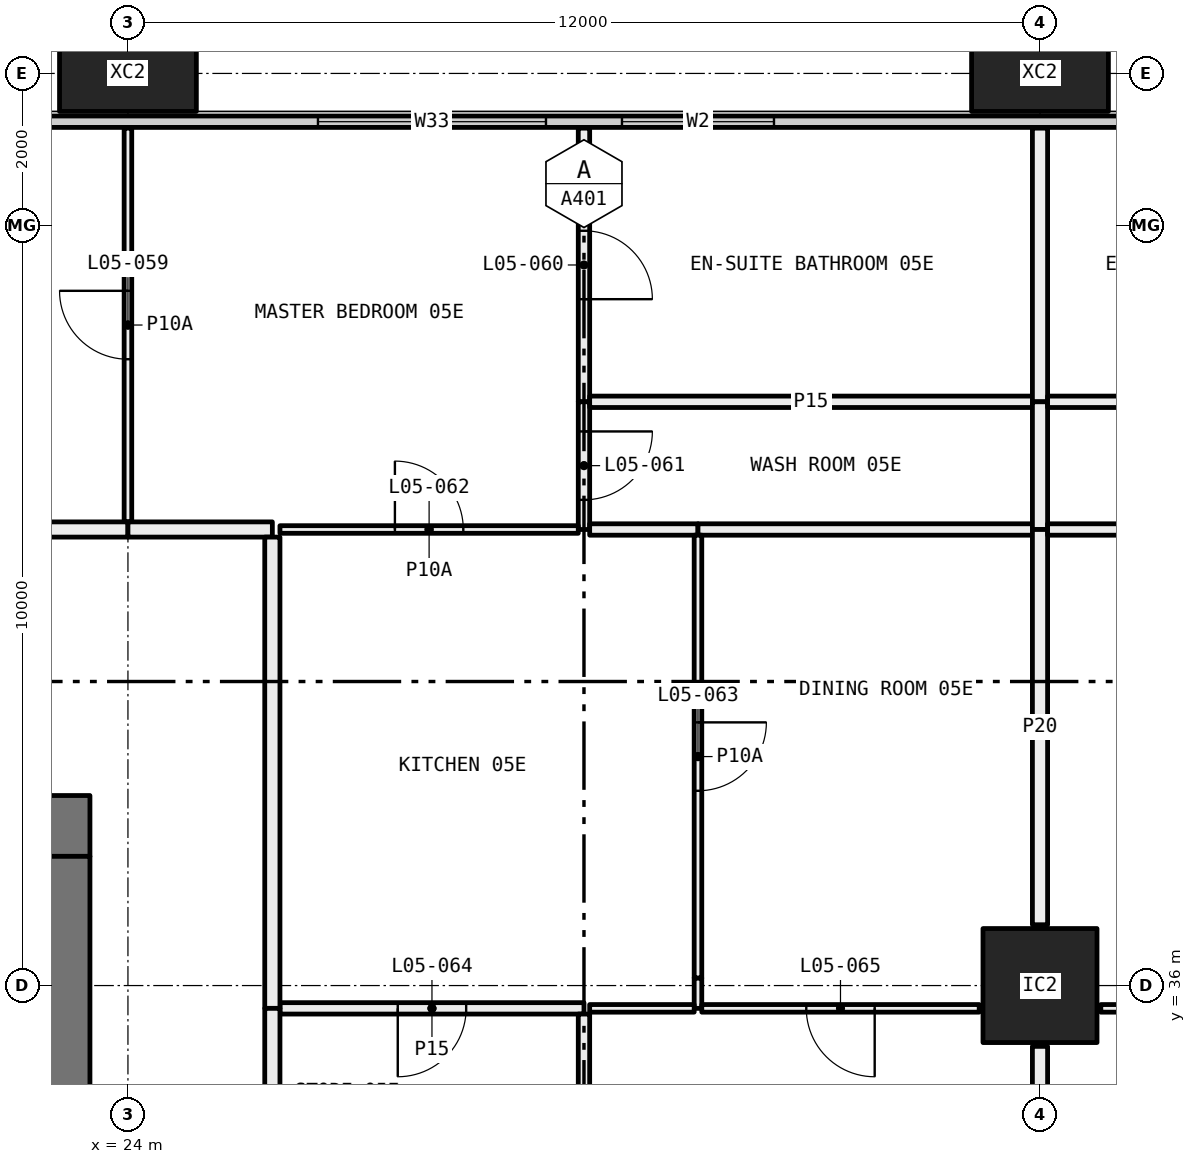
"""IFC4 building model, lengths in metres.
Left out: names, types, materials, properties, quantities, classifications, styles, units other than length and angle.
Written with IfcOpenShell. Run it as: python <this file> out.ifc"""

import sys

from ifc_helpers import new_model, si_unit, direction, frame, frame_2d, origin, origin_2d, place, context, subcontext, project, spatial, rectangle, hollow_rectangle, extrude, element, fill, save


model = new_model("IFC4")
c1 = context("Model", 3, precision=1e-05, world=origin(), true_north=direction((0.0, 1.0)))
c2 = subcontext(c1, "Body", "Model", "MODEL_VIEW")
j1 = project(units=[si_unit("LENGTHUNIT", "METRE"), si_unit("PLANEANGLEUNIT", "RADIAN")], contexts=[c1])
p1 = place(None, origin())
s1 = spatial("IfcSite", under=j1, at=p1, CompositionType="ELEMENT")
p2 = place(p1, origin())
s2 = spatial("IfcBuilding", under=s1, at=p2, CompositionType="ELEMENT")
p3 = place(p2, frame((0.0, 0.0, 30.0)))
s3 = spatial("IfcBuildingStorey", under=s2, at=p3, CompositionType="ELEMENT", Elevation=30.0)
p4 = place(p3, frame((24.0, 48.0, -0.4), z_axis=(0.0, 0.0, 1.0), x_axis=(1.0, 0.0, 0.0)))
e1 = element("IfcColumn", 1, at=p4, inside=s3, PredefinedType="COLUMN", context=c2, shape_type="SweptSolid", body=[
    extrude(hollow_rectangle(XDim=1.8, YDim=1.0, WallThickness=0.07, at=origin_2d()), origin(), (0.0, 0.0, 1.0), 3.45),
])
p5 = place(p3, frame((36.0, 36.0, 0.0), z_axis=(0.0, 0.0, 1.0), x_axis=(1.0, 0.0, 0.0)))
e2 = element("IfcColumn", 2, at=p5, inside=s3, PredefinedType="COLUMN", context=c2, shape_type="SweptSolid", body=[
    extrude(hollow_rectangle(XDim=1.5, YDim=1.5, WallThickness=0.065, at=origin_2d()), origin(), (0.0, 0.0, 1.0), 3.05),
])
p6 = place(p3, frame((36.0, 48.0, -0.4), z_axis=(0.0, 0.0, 1.0), x_axis=(1.0, 0.0, 0.0)))
e3 = element("IfcColumn", 3, at=p6, inside=s3, PredefinedType="COLUMN", context=c2, shape_type="SweptSolid", body=[
    extrude(hollow_rectangle(XDim=1.8, YDim=1.0, WallThickness=0.07, at=origin_2d()), origin(), (0.0, 0.0, 1.0), 3.45),
])
p7 = place(p3, frame((6.56, 47.365, 0.0), z_axis=(0.0, 0.0, 1.0), x_axis=(1.0, 0.0, 0.0)))
e4 = element("IfcWall", 4, at=p7, inside=s3, PredefinedType="ELEMENTEDWALL", context=c2, shape_type="SweptSolid", body=[
    extrude(rectangle(XDim=58.88, YDim=0.15, at=frame_2d((29.44, 0.0))), origin(), (0.0, 0.0, 1.0), 3.05),
])
p8 = place(p7, frame((0.44, 0.0, 0.45)))
e5 = element("IfcOpeningElement", 5, at=p8, cuts=e4, PredefinedType="OPENING", context=c2, shape_type="SweptSolid", body=[
    extrude(rectangle(XDim=4.5, YDim=2.55, at=frame_2d((2.25, 1.275))), frame((0.0, 0.085, 0.0), z_axis=(0.0, -1.0, 0.0), x_axis=(1.0, 0.0, 0.0)), (0.0, 0.0, 1.0), 0.17),
])
p9 = place(p7, frame((7.94, 0.0, 0.45)))
e6 = element("IfcOpeningElement", 6, at=p9, cuts=e4, PredefinedType="OPENING", context=c2, shape_type="SweptSolid", body=[
    extrude(rectangle(XDim=3.0, YDim=2.55, at=frame_2d((1.5, 1.275))), frame((0.0, 0.085, 0.0), z_axis=(0.0, -1.0, 0.0), x_axis=(1.0, 0.0, 0.0)), (0.0, 0.0, 1.0), 0.17),
])
p10 = place(p7, frame((11.94, 0.0, 0.45)))
e7 = element("IfcOpeningElement", 7, at=p10, cuts=e4, PredefinedType="OPENING", context=c2, shape_type="SweptSolid", body=[
    extrude(rectangle(XDim=3.0, YDim=2.55, at=frame_2d((1.5, 1.275))), frame((0.0, 0.085, 0.0), z_axis=(0.0, -1.0, 0.0), x_axis=(1.0, 0.0, 0.0)), (0.0, 0.0, 1.0), 0.17),
])
p11 = place(p7, frame((19.94, 0.0, 0.45)))
e8 = element("IfcOpeningElement", 8, at=p11, cuts=e4, PredefinedType="OPENING", context=c2, shape_type="SweptSolid", body=[
    extrude(rectangle(XDim=3.0, YDim=2.55, at=frame_2d((1.5, 1.275))), frame((0.0, 0.085, 0.0), z_axis=(0.0, -1.0, 0.0), x_axis=(1.0, 0.0, 0.0)), (0.0, 0.0, 1.0), 0.17),
])
p12 = place(p7, frame((23.94, 0.0, 0.45)))
e9 = element("IfcOpeningElement", 9, at=p12, cuts=e4, PredefinedType="OPENING", context=c2, shape_type="SweptSolid", body=[
    extrude(rectangle(XDim=2.0, YDim=2.55, at=frame_2d((1.0, 1.275))), frame((0.0, 0.085, 0.0), z_axis=(0.0, -1.0, 0.0), x_axis=(1.0, 0.0, 0.0)), (0.0, 0.0, 1.0), 0.17),
])
p13 = place(p7, frame((31.94, 0.0, 0.45)))
e10 = element("IfcOpeningElement", 10, at=p13, cuts=e4, PredefinedType="OPENING", context=c2, shape_type="SweptSolid", body=[
    extrude(rectangle(XDim=3.0, YDim=2.55, at=frame_2d((1.5, 1.275))), frame((0.0, 0.085, 0.0), z_axis=(0.0, -1.0, 0.0), x_axis=(1.0, 0.0, 0.0)), (0.0, 0.0, 1.0), 0.17),
])
p14 = place(p7, frame((35.94, 0.0, 0.45)))
e11 = element("IfcOpeningElement", 11, at=p14, cuts=e4, PredefinedType="OPENING", context=c2, shape_type="SweptSolid", body=[
    extrude(rectangle(XDim=3.0, YDim=2.55, at=frame_2d((1.5, 1.275))), frame((0.0, 0.085, 0.0), z_axis=(0.0, -1.0, 0.0), x_axis=(1.0, 0.0, 0.0)), (0.0, 0.0, 1.0), 0.17),
])
p15 = place(p7, frame((43.94, 0.0, 0.45)))
e12 = element("IfcOpeningElement", 12, at=p15, cuts=e4, PredefinedType="OPENING", context=c2, shape_type="SweptSolid", body=[
    extrude(rectangle(XDim=3.0, YDim=2.55, at=frame_2d((1.5, 1.275))), frame((0.0, 0.085, 0.0), z_axis=(0.0, -1.0, 0.0), x_axis=(1.0, 0.0, 0.0)), (0.0, 0.0, 1.0), 0.17),
])
p16 = place(p7, frame((47.94, 0.0, 0.45)))
e13 = element("IfcOpeningElement", 13, at=p16, cuts=e4, PredefinedType="OPENING", context=c2, shape_type="SweptSolid", body=[
    extrude(rectangle(XDim=2.0, YDim=2.55, at=frame_2d((1.0, 1.275))), frame((0.0, 0.085, 0.0), z_axis=(0.0, -1.0, 0.0), x_axis=(1.0, 0.0, 0.0)), (0.0, 0.0, 1.0), 0.17),
])
p17 = place(p7, frame((53.94, 0.0, 0.45)))
e14 = element("IfcOpeningElement", 14, at=p17, cuts=e4, PredefinedType="OPENING", context=c2, shape_type="SweptSolid", body=[
    extrude(rectangle(XDim=4.5, YDim=2.55, at=frame_2d((2.25, 1.275))), frame((0.0, 0.085, 0.0), z_axis=(0.0, -1.0, 0.0), x_axis=(1.0, 0.0, 0.0)), (0.0, 0.0, 1.0), 0.17),
])
p18 = place(p3, frame((24.0, 42.1, 0.0), z_axis=(0.0, 0.0, 1.0), x_axis=(0.0, 1.0, 0.0)))
e15 = element("IfcWall", 15, at=p18, inside=s3, PredefinedType="PARTITIONING", context=c2, shape_type="SweptSolid", body=[
    extrude(rectangle(XDim=5.18, YDim=0.1, at=frame_2d((2.59, 0.0))), origin(), (0.0, 0.0, 1.0), 3.05),
])
p19 = place(p18, frame((2.14, 0.0, 0.0)))
e16 = element("IfcOpeningElement", 16, at=p19, cuts=e15, PredefinedType="OPENING", context=c2, shape_type="SweptSolid", body=[
    extrude(rectangle(XDim=0.9, YDim=2.1, at=frame_2d((0.45, 1.05))), frame((0.0, 0.06, 0.0), z_axis=(0.0, -1.0, 0.0), x_axis=(1.0, 0.0, 0.0)), (0.0, 0.0, 1.0), 0.12),
])
p20 = place(p3, frame((18.0, 42.0, 0.0), z_axis=(0.0, 0.0, 1.0), x_axis=(1.0, 0.0, 0.0)))
e17 = element("IfcWall", 17, at=p20, inside=s3, PredefinedType="PARTITIONING", context=c2, shape_type="SweptSolid", body=[
    extrude(rectangle(XDim=6.0, YDim=0.2, at=frame_2d((3.0, 0.0))), origin(), (0.0, 0.0, 1.0), 3.05),
])
p21 = place(p3, frame((30.0, 43.68, 0.0), z_axis=(0.0, 0.0, 1.0), x_axis=(0.0, 1.0, 0.0)))
e18 = element("IfcWall", 18, at=p21, inside=s3, PredefinedType="PARTITIONING", context=c2, shape_type="SweptSolid", body=[
    extrude(rectangle(XDim=3.6, YDim=0.15, at=frame_2d((1.8, 0.0))), origin(), (0.0, 0.0, 1.0), 3.05),
])
p22 = place(p21, frame((1.35, 0.0, 0.0)))
e19 = element("IfcOpeningElement", 19, at=p22, cuts=e18, PredefinedType="OPENING", context=c2, shape_type="SweptSolid", body=[
    extrude(rectangle(XDim=0.9, YDim=2.1, at=frame_2d((0.45, 1.05))), frame((0.0, 0.085, 0.0), z_axis=(0.0, -1.0, 0.0), x_axis=(1.0, 0.0, 0.0)), (0.0, 0.0, 1.0), 0.17),
])
p23 = place(p3, frame((30.0, 42.0, 0.0), z_axis=(0.0, 0.0, 1.0), x_axis=(0.0, 1.0, 0.0)))
e20 = element("IfcWall", 20, at=p23, inside=s3, PredefinedType="PARTITIONING", context=c2, shape_type="SweptSolid", body=[
    extrude(rectangle(XDim=1.68, YDim=0.15, at=frame_2d((0.84, 0.0))), origin(), (0.0, 0.0, 1.0), 3.05),
])
p24 = place(p23, frame((0.39, 0.0, 0.0)))
e21 = element("IfcOpeningElement", 21, at=p24, cuts=e20, PredefinedType="OPENING", context=c2, shape_type="SweptSolid", body=[
    extrude(rectangle(XDim=0.9, YDim=2.1, at=frame_2d((0.45, 1.05))), frame((0.0, 0.085, 0.0), z_axis=(0.0, -1.0, 0.0), x_axis=(1.0, 0.0, 0.0)), (0.0, 0.0, 1.0), 0.17),
])
p25 = place(p3, frame((26.0, 42.0, 0.0), z_axis=(0.0, 0.0, 1.0), x_axis=(1.0, 0.0, 0.0)))
e22 = element("IfcWall", 22, at=p25, inside=s3, PredefinedType="PARTITIONING", context=c2, shape_type="SweptSolid", body=[
    extrude(rectangle(XDim=3.925, YDim=0.1, at=frame_2d((1.962, 0.0))), origin(), (0.0, 0.0, 1.0), 3.05),
])
p26 = place(p25, frame((1.512, 0.0, 0.0)))
e23 = element("IfcOpeningElement", 23, at=p26, cuts=e22, PredefinedType="OPENING", context=c2, shape_type="SweptSolid", body=[
    extrude(rectangle(XDim=0.9, YDim=2.1, at=frame_2d((0.45, 1.05))), frame((0.0, 0.06, 0.0), z_axis=(0.0, -1.0, 0.0), x_axis=(1.0, 0.0, 0.0)), (0.0, 0.0, 1.0), 0.12),
])
p27 = place(p3, frame((24.0, 42.0, 0.0), z_axis=(0.0, 0.0, 1.0), x_axis=(1.0, 0.0, 0.0)))
e24 = element("IfcWall", 24, at=p27, inside=s3, PredefinedType="PARTITIONING", context=c2, shape_type="SweptSolid", body=[
    extrude(rectangle(XDim=1.9, YDim=0.2, at=frame_2d((0.95, 0.0))), origin(), (0.0, 0.0, 1.0), 3.05),
])
p28 = place(p3, frame((30.075, 43.68, 0.0), z_axis=(0.0, 0.0, 1.0), x_axis=(1.0, 0.0, 0.0)))
e25 = element("IfcWall", 25, at=p28, inside=s3, PredefinedType="PARTITIONING", context=c2, shape_type="SweptSolid", body=[
    extrude(rectangle(XDim=5.825, YDim=0.15, at=frame_2d((2.913, 0.0))), origin(), (0.0, 0.0, 1.0), 3.05),
])
p29 = place(p3, frame((36.0, 43.68, 0.0), z_axis=(0.0, 0.0, 1.0), x_axis=(0.0, 1.0, 0.0)))
e26 = element("IfcWall", 26, at=p29, inside=s3, PredefinedType="PARTITIONING", context=c2, shape_type="SweptSolid", body=[
    extrude(rectangle(XDim=3.6, YDim=0.2, at=frame_2d((1.8, 0.0))), origin(), (0.0, 0.0, 1.0), 2.45),
])
p30 = place(p3, frame((30.075, 42.0, 0.0), z_axis=(0.0, 0.0, 1.0), x_axis=(1.0, 0.0, 0.0)))
e27 = element("IfcWall", 27, at=p30, inside=s3, PredefinedType="PARTITIONING", context=c2, shape_type="SweptSolid", body=[
    extrude(rectangle(XDim=1.425, YDim=0.15, at=frame_2d((0.712, 0.0))), origin(), (0.0, 0.0, 1.0), 3.05),
])
p31 = place(p3, frame((31.5, 42.0, 0.0), z_axis=(0.0, 0.0, 1.0), x_axis=(1.0, 0.0, 0.0)))
e28 = element("IfcWall", 28, at=p31, inside=s3, PredefinedType="PARTITIONING", context=c2, shape_type="SweptSolid", body=[
    extrude(rectangle(XDim=4.4, YDim=0.15, at=frame_2d((2.2, 0.0))), origin(), (0.0, 0.0, 1.0), 3.05),
])
p32 = place(p3, frame((36.0, 42.0, 0.0), z_axis=(0.0, 0.0, 1.0), x_axis=(0.0, 1.0, 0.0)))
e29 = element("IfcWall", 29, at=p32, inside=s3, PredefinedType="PARTITIONING", context=c2, shape_type="SweptSolid", body=[
    extrude(rectangle(XDim=1.68, YDim=0.2, at=frame_2d((0.84, 0.0))), origin(), (0.0, 0.0, 1.0), 2.45),
])
p33 = place(p3, frame((31.5, 35.7, 0.0), z_axis=(0.0, 0.0, 1.0), x_axis=(0.0, 1.0, 0.0)))
e30 = element("IfcWall", 30, at=p33, inside=s3, PredefinedType="PARTITIONING", context=c2, shape_type="SweptSolid", body=[
    extrude(rectangle(XDim=0.4, YDim=0.1, at=frame_2d((0.2, 0.0))), origin(), (0.0, 0.0, 1.0), 2.45),
])
p34 = place(p3, frame((31.5, 36.1, 0.0), z_axis=(0.0, 0.0, 1.0), x_axis=(0.0, 1.0, 0.0)))
e31 = element("IfcWall", 31, at=p34, inside=s3, PredefinedType="PARTITIONING", context=c2, shape_type="SweptSolid", body=[
    extrude(rectangle(XDim=5.825, YDim=0.1, at=frame_2d((2.913, 0.0))), origin(), (0.0, 0.0, 1.0), 3.05),
])
p35 = place(p34, frame((2.462, 0.0, 0.0)))
e32 = element("IfcOpeningElement", 32, at=p35, cuts=e31, PredefinedType="OPENING", context=c2, shape_type="SweptSolid", body=[
    extrude(rectangle(XDim=0.9, YDim=2.1, at=frame_2d((0.45, 1.05))), frame((0.0, 0.06, 0.0), z_axis=(0.0, -1.0, 0.0), x_axis=(1.0, 0.0, 0.0)), (0.0, 0.0, 1.0), 0.12),
])
p36 = place(p3, frame((26.0, 35.7, 0.0), z_axis=(0.0, 0.0, 1.0), x_axis=(1.0, 0.0, 0.0)))
e33 = element("IfcWall", 33, at=p36, inside=s3, PredefinedType="PARTITIONING", context=c2, shape_type="SweptSolid", body=[
    extrude(rectangle(XDim=4.0, YDim=0.15, at=frame_2d((2.0, 0.0))), origin(), (0.0, 0.0, 1.0), 3.05),
])
p37 = place(p36, frame((1.55, 0.0, 0.0)))
e34 = element("IfcOpeningElement", 34, at=p37, cuts=e33, PredefinedType="OPENING", context=c2, shape_type="SweptSolid", body=[
    extrude(rectangle(XDim=0.9, YDim=2.1, at=frame_2d((0.45, 1.05))), frame((0.0, 0.085, 0.0), z_axis=(0.0, -1.0, 0.0), x_axis=(1.0, 0.0, 0.0)), (0.0, 0.0, 1.0), 0.17),
])
p38 = place(p3, frame((30.075, 35.7, 0.0), z_axis=(0.0, 0.0, 1.0), x_axis=(1.0, 0.0, 0.0)))
e35 = element("IfcWall", 35, at=p38, inside=s3, PredefinedType="PARTITIONING", context=c2, shape_type="SweptSolid", body=[
    extrude(rectangle(XDim=1.375, YDim=0.1, at=frame_2d((0.688, 0.0))), origin(), (0.0, 0.0, 1.0), 3.05),
])
p39 = place(p3, frame((25.9, 41.9, 0.0), z_axis=(0.0, 0.0, 1.0), x_axis=(0.0, -1.0, 0.0)))
e36 = element("IfcWall", 36, at=p39, inside=s3, PredefinedType="PARTITIONING", context=c2, shape_type="SweptSolid", body=[
    extrude(rectangle(XDim=6.2, YDim=0.2, at=frame_2d((3.1, 0.0))), origin(), (0.0, 0.0, 1.0), 2.45),
])
p40 = place(p3, frame((31.55, 35.7, 0.0), z_axis=(0.0, 0.0, 1.0), x_axis=(1.0, 0.0, 0.0)))
e37 = element("IfcWall", 37, at=p40, inside=s3, PredefinedType="PARTITIONING", context=c2, shape_type="SweptSolid", body=[
    extrude(rectangle(XDim=3.65, YDim=0.1, at=frame_2d((1.825, 0.0))), origin(), (0.0, 0.0, 1.0), 3.05),
])
p41 = place(p40, frame((1.375, 0.0, 0.0)))
e38 = element("IfcOpeningElement", 38, at=p41, cuts=e37, PredefinedType="OPENING", context=c2, shape_type="SweptSolid", body=[
    extrude(rectangle(XDim=0.9, YDim=2.1, at=frame_2d((0.45, 1.05))), frame((0.0, 0.06, 0.0), z_axis=(0.0, -1.0, 0.0), x_axis=(1.0, 0.0, 0.0)), (0.0, 0.0, 1.0), 0.12),
])
p42 = place(p3, frame((36.0, 36.8, 0.0), z_axis=(0.0, 0.0, 1.0), x_axis=(0.0, 1.0, 0.0)))
e39 = element("IfcWall", 39, at=p42, inside=s3, PredefinedType="PARTITIONING", context=c2, shape_type="SweptSolid", body=[
    extrude(rectangle(XDim=5.2, YDim=0.2, at=frame_2d((2.6, 0.0))), origin(), (0.0, 0.0, 1.0), 2.45),
])
p43 = place(p3, frame((30.0, 33.675, 0.0), z_axis=(0.0, 0.0, 1.0), x_axis=(0.0, 1.0, 0.0)))
e40 = element("IfcWall", 40, at=p43, inside=s3, PredefinedType="PARTITIONING", context=c2, shape_type="SweptSolid", body=[
    extrude(rectangle(XDim=1.95, YDim=0.15, at=frame_2d((0.975, 0.0))), origin(), (0.0, 0.0, 1.0), 3.05),
])
p44 = place(p3, frame((25.9, 35.7, 0.0), z_axis=(0.0, 0.0, 1.0), x_axis=(0.0, -1.0, 0.0)))
e41 = element("IfcWall", 41, at=p44, inside=s3, PredefinedType="PARTITIONING", context=c2, shape_type="SweptSolid", body=[
    extrude(rectangle(XDim=2.1, YDim=0.2, at=frame_2d((1.05, 0.0))), origin(), (0.0, 0.0, 1.0), 3.05),
])
p45 = place(p3, frame((36.0, 31.2, 0.0), z_axis=(0.0, 0.0, 1.0), x_axis=(0.0, 1.0, 0.0)))
e42 = element("IfcWall", 42, at=p45, inside=s3, PredefinedType="PARTITIONING", context=c2, shape_type="SweptSolid", body=[
    extrude(rectangle(XDim=4.0, YDim=0.2, at=frame_2d((2.0, 0.0))), origin(), (0.0, 0.0, 1.0), 2.45),
])
p46 = place(p3, frame((36.1, 43.68, 0.0), z_axis=(0.0, 0.0, 1.0), x_axis=(1.0, 0.0, 0.0)))
e43 = element("IfcWall", 43, at=p46, inside=s3, PredefinedType="PARTITIONING", context=c2, shape_type="SweptSolid", body=[
    extrude(rectangle(XDim=5.9, YDim=0.15, at=frame_2d((2.95, 0.0))), origin(), (0.0, 0.0, 1.0), 3.05),
])
p47 = place(p3, frame((36.1, 42.0, 0.0), z_axis=(0.0, 0.0, 1.0), x_axis=(1.0, 0.0, 0.0)))
e44 = element("IfcWall", 44, at=p47, inside=s3, PredefinedType="PARTITIONING", context=c2, shape_type="SweptSolid", body=[
    extrude(rectangle(XDim=4.4, YDim=0.15, at=frame_2d((2.2, 0.0))), origin(), (0.0, 0.0, 1.0), 3.05),
])
p48 = place(p3, frame((36.8, 35.7, 0.0), z_axis=(0.0, 0.0, 1.0), x_axis=(1.0, 0.0, 0.0)))
e45 = element("IfcWall", 45, at=p48, inside=s3, PredefinedType="PARTITIONING", context=c2, shape_type="SweptSolid", body=[
    extrude(rectangle(XDim=3.65, YDim=0.1, at=frame_2d((1.825, 0.0))), origin(), (0.0, 0.0, 1.0), 3.05),
])
p49 = place(p3, frame((12.5, 38.1, 0.0), z_axis=(0.0, 0.0, 1.0), x_axis=(1.0, 0.0, 0.0)))
e46 = element("IfcWall", 46, at=p49, inside=s3, PredefinedType="SHEAR", context=c2, shape_type="SweptSolid", body=[
    extrude(rectangle(XDim=11.0, YDim=0.8, at=frame_2d((5.5, 0.0))), origin(), (0.0, 0.0, 1.0), 3.05),
])
p50 = place(p49, frame((8.4, 0.0, 0.0)))
e47 = element("IfcOpeningElement", 47, at=p50, cuts=e46, PredefinedType="OPENING", context=c2, shape_type="SweptSolid", body=[
    extrude(rectangle(XDim=1.6, YDim=2.1, at=frame_2d((0.8, 1.05))), frame((0.0, 0.41, 0.0), z_axis=(0.0, -1.0, 0.0), x_axis=(1.0, 0.0, 0.0)), (0.0, 0.0, 1.0), 0.82),
])
p51 = place(p3, frame((23.1, 22.3, 0.0), z_axis=(0.0, 0.0, 1.0), x_axis=(0.0, 1.0, 0.0)))
e48 = element("IfcWall", 48, at=p51, inside=s3, PredefinedType="SHEAR", context=c2, shape_type="SweptSolid", body=[
    extrude(rectangle(XDim=15.4, YDim=0.8, at=frame_2d((7.7, 0.0))), origin(), (0.0, 0.0, 1.0), 3.05),
])
p52 = place(p51, frame((6.9, 0.0, 0.0)))
e49 = element("IfcOpeningElement", 49, at=p52, cuts=e48, PredefinedType="OPENING", context=c2, shape_type="SweptSolid", body=[
    extrude(rectangle(XDim=1.6, YDim=2.1, at=frame_2d((0.8, 1.05))), frame((0.0, 0.41, 0.0), z_axis=(0.0, -1.0, 0.0), x_axis=(1.0, 0.0, 0.0)), (0.0, 0.0, 1.0), 0.82),
])
p53 = place(p11, origin())
e50 = element("IfcWindow", 50, at=p53, inside=s3, PartitioningType="SINGLE_PANEL", PredefinedType="WINDOW", context=c2, shape_type="SweptSolid", body=[
    extrude(rectangle(XDim=3.0, YDim=2.55, at=frame_2d((1.5, 1.275))), frame((0.0, 0.03, 0.0), z_axis=(0.0, -1.0, 0.0), x_axis=(1.0, 0.0, 0.0)), (0.0, 0.0, 1.0), 0.06),
])
fill(e8, e50)
p54 = place(p12, origin())
e51 = element("IfcWindow", 51, at=p54, inside=s3, PartitioningType="SINGLE_PANEL", PredefinedType="WINDOW", context=c2, shape_type="SweptSolid", body=[
    extrude(rectangle(XDim=2.0, YDim=2.55, at=frame_2d((1.0, 1.275))), frame((0.0, 0.03, 0.0), z_axis=(0.0, -1.0, 0.0), x_axis=(1.0, 0.0, 0.0)), (0.0, 0.0, 1.0), 0.06),
])
fill(e9, e51)
p55 = place(p19, origin())
e52 = element("IfcDoor", 52, at=p55, inside=s3, OperationType="SINGLE_SWING_LEFT", PredefinedType="DOOR", context=c2, shape_type="SweptSolid", body=[
    extrude(rectangle(XDim=0.9, YDim=2.1, at=frame_2d((0.45, 1.05))), frame((0.0, 0.025, 0.0), z_axis=(0.0, -1.0, 0.0), x_axis=(1.0, 0.0, 0.0)), (0.0, 0.0, 1.0), 0.05),
])
fill(e16, e52)
p56 = place(p22, frame((0.9, 0.0, 0.0), x_axis=(-1.0, 0.0, 0.0)))
e53 = element("IfcDoor", 53, at=p56, inside=s3, OperationType="SINGLE_SWING_LEFT", PredefinedType="DOOR", context=c2, shape_type="SweptSolid", body=[
    extrude(rectangle(XDim=0.9, YDim=2.1, at=frame_2d((0.45, 1.05))), frame((0.0, 0.025, 0.0), z_axis=(0.0, -1.0, 0.0), x_axis=(1.0, 0.0, 0.0)), (0.0, 0.0, 1.0), 0.05),
])
fill(e19, e53)
p57 = place(p24, frame((0.9, 0.0, 0.0), x_axis=(-1.0, 0.0, 0.0)))
e54 = element("IfcDoor", 54, at=p57, inside=s3, OperationType="SINGLE_SWING_RIGHT", PredefinedType="DOOR", context=c2, shape_type="SweptSolid", body=[
    extrude(rectangle(XDim=0.9, YDim=2.1, at=frame_2d((0.45, 1.05))), frame((0.0, 0.025, 0.0), z_axis=(0.0, -1.0, 0.0), x_axis=(1.0, 0.0, 0.0)), (0.0, 0.0, 1.0), 0.05),
])
fill(e21, e54)
p58 = place(p26, origin())
e55 = element("IfcDoor", 55, at=p58, inside=s3, OperationType="SINGLE_SWING_RIGHT", PredefinedType="DOOR", context=c2, shape_type="SweptSolid", body=[
    extrude(rectangle(XDim=0.9, YDim=2.1, at=frame_2d((0.45, 1.05))), frame((0.0, 0.025, 0.0), z_axis=(0.0, -1.0, 0.0), x_axis=(1.0, 0.0, 0.0)), (0.0, 0.0, 1.0), 0.05),
])
fill(e23, e55)
p59 = place(p35, frame((0.9, 0.0, 0.0), x_axis=(-1.0, 0.0, 0.0)))
e56 = element("IfcDoor", 56, at=p59, inside=s3, OperationType="SINGLE_SWING_RIGHT", PredefinedType="DOOR", context=c2, shape_type="SweptSolid", body=[
    extrude(rectangle(XDim=0.9, YDim=2.1, at=frame_2d((0.45, 1.05))), frame((0.0, 0.025, 0.0), z_axis=(0.0, -1.0, 0.0), x_axis=(1.0, 0.0, 0.0)), (0.0, 0.0, 1.0), 0.05),
])
fill(e32, e56)
p60 = place(p37, frame((0.9, 0.0, 0.0), x_axis=(-1.0, 0.0, 0.0)))
e57 = element("IfcDoor", 57, at=p60, inside=s3, OperationType="SINGLE_SWING_LEFT", PredefinedType="DOOR", context=c2, shape_type="SweptSolid", body=[
    extrude(rectangle(XDim=0.9, YDim=2.1, at=frame_2d((0.45, 1.05))), frame((0.0, 0.025, 0.0), z_axis=(0.0, -1.0, 0.0), x_axis=(1.0, 0.0, 0.0)), (0.0, 0.0, 1.0), 0.05),
])
fill(e34, e57)
p61 = place(p41, frame((0.9, 0.0, 0.0), x_axis=(-1.0, 0.0, 0.0)))
e58 = element("IfcDoor", 58, at=p61, inside=s3, OperationType="SINGLE_SWING_RIGHT", PredefinedType="DOOR", context=c2, shape_type="SweptSolid", body=[
    extrude(rectangle(XDim=0.9, YDim=2.1, at=frame_2d((0.45, 1.05))), frame((0.0, 0.025, 0.0), z_axis=(0.0, -1.0, 0.0), x_axis=(1.0, 0.0, 0.0)), (0.0, 0.0, 1.0), 0.05),
])
fill(e38, e58)
save(model, sys.argv[1])
